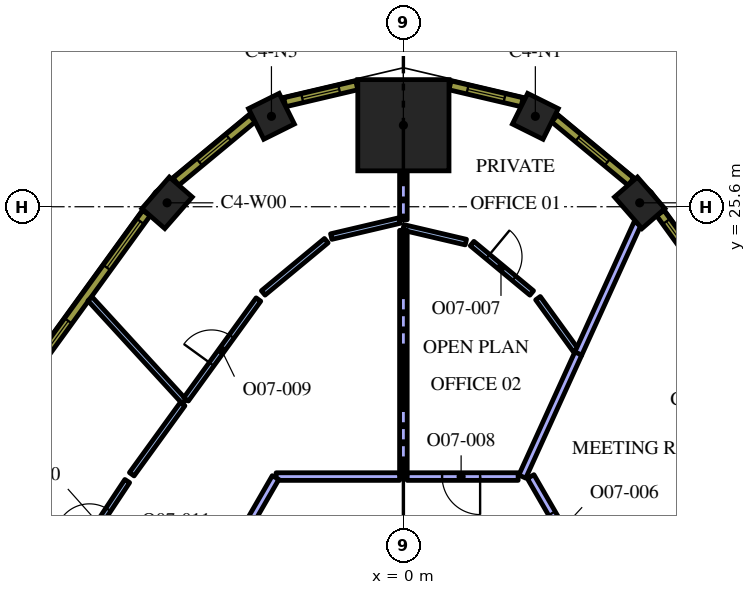
"""IFC4 building model, lengths in metres.
Left out: names, types, materials, properties, quantities, classifications, styles, units other than length and angle.
Written with IfcOpenShell. Run it as: python <this file> out.ifc"""

import sys

from ifc_helpers import new_model, si_unit, direction, frame, frame_2d, origin, origin_2d, place, context, subcontext, project, spatial, rectangle, extrude, element, fill, save


model = new_model("IFC4")
c1 = context("Model", 3, precision=1e-05, world=origin(), true_north=direction((0.0, 1.0)))
c2 = subcontext(c1, "Body", "Model", "MODEL_VIEW")
j1 = project(units=[si_unit("LENGTHUNIT", "METRE"), si_unit("PLANEANGLEUNIT", "RADIAN")], contexts=[c1])
p1 = place(None, origin())
s1 = spatial("IfcSite", under=j1, at=p1, CompositionType="ELEMENT")
p2 = place(p1, origin())
s2 = spatial("IfcBuilding", under=s1, at=p2, CompositionType="ELEMENT")
p3 = place(p2, frame((0.0, 0.0, 218.4)))
s3 = spatial("IfcBuildingStorey", under=s2, at=p3, CompositionType="ELEMENT", Elevation=218.4)
p4 = place(p3, frame((0.0, 27.744, 0.0), z_axis=(0.0, 0.0, 1.0), x_axis=(0.0, 1.0, 0.0)))
e1 = element("IfcColumn", 1, at=p4, inside=s3, PredefinedType="COLUMN", context=c2, shape_type="SweptSolid", body=[
    extrude(rectangle(XDim=2.4, YDim=2.4, at=origin_2d()), origin(), (0.0, 0.0, 1.0), 4.2),
])
p5 = place(p3, frame((6.219, 25.703, 0.0), z_axis=(0.0, 0.0, 1.0), x_axis=(-0.657250291216, 0.753672378886, 0.0)))
e2 = element("IfcColumn", 2, at=p5, inside=s3, PredefinedType="COLUMN", context=c2, shape_type="SweptSolid", body=[
    extrude(rectangle(XDim=1.1, YDim=0.8, at=origin_2d()), origin(), (0.0, 0.0, 1.0), 4.2),
])
for number, where, z_axis, x_axis in (
    (3, (3.472, 27.979, 0.0), (0.0, 0.0, 1.0), (-0.895, 0.445, 0.0)),
    (4, (-3.472, 27.979, 0.0), (0.0, 0.0, 1.0), (-0.895, -0.445, 0.0)),
):
    element("IfcColumn", number, at=place(p3, frame(where, z_axis=z_axis, x_axis=x_axis)), inside=s3, PredefinedType="COLUMN", context=c2, shape_type="SweptSolid", body=[
        extrude(rectangle(XDim=0.9, YDim=0.9, at=origin_2d()), origin(), (0.0, 0.0, 1.0), 4.2),
    ])
p6 = place(p3, frame((-6.219, 25.703, 0.0), z_axis=(0.0, 0.0, 1.0), x_axis=(-0.657250291216, -0.753672378886, 0.0)))
e5 = element("IfcColumn", 5, at=p6, inside=s3, PredefinedType="COLUMN", context=c2, shape_type="SweptSolid", body=[
    extrude(rectangle(XDim=1.1, YDim=0.8, at=origin_2d()), origin(), (0.0, 0.0, 1.0), 4.2),
])
p7 = place(p3, frame((7.011, 15.156, 0.0), z_axis=(0.0, 0.0, 1.0), x_axis=(0.866015917575, 0.500016430238, 0.0)))
e6 = element("IfcWall", 6, at=p7, inside=s3, PredefinedType="PARTITIONING", context=c2, shape_type="SweptSolid", body=[
    extrude(rectangle(XDim=5.607, YDim=0.2, at=frame_2d((2.804, 0.0))), origin(), (0.0, 0.0, 1.0), 3.45),
])
p8 = place(p3, frame((4.599, 21.729, 0.0), z_axis=(0.0, 0.0, 1.0), x_axis=(0.414300595715, 0.91014010811, 0.0)))
e7 = element("IfcWall", 7, at=p8, inside=s3, PredefinedType="PARTITIONING", context=c2, shape_type="SweptSolid", body=[
    extrude(rectangle(XDim=3.77, YDim=0.2, at=frame_2d((1.885, 0.0))), origin(), (0.0, 0.0, 1.0), 3.45),
])
p9 = place(p3, frame((3.129, 18.5, 0.0), z_axis=(0.0, 0.0, 1.0), x_axis=(0.41435618773, 0.910114800281, 0.0)))
e8 = element("IfcWall", 8, at=p9, inside=s3, PredefinedType="PARTITIONING", context=c2, shape_type="SweptSolid", body=[
    extrude(rectangle(XDim=3.557, YDim=0.2, at=frame_2d((1.779, 0.0))), origin(), (0.0, 0.0, 1.0), 3.45),
])
p10 = place(p3, frame((5.007, 15.627, 0.0), z_axis=(0.0, 0.0, 1.0), x_axis=(-0.499962429619, 0.866047093968, 0.0)))
e9 = element("IfcWall", 9, at=p10, inside=s3, PredefinedType="PARTITIONING", context=c2, shape_type="SweptSolid", body=[
    extrude(rectangle(XDim=3.317, YDim=0.2, at=frame_2d((1.659, 0.0))), origin(), (0.0, 0.0, 1.0), 3.45),
])
p11 = place(p10, frame((1.2, 0.0, 0.0)))
e10 = element("IfcOpeningElement", 10, at=p11, cuts=e9, PredefinedType="OPENING", context=c2, shape_type="SweptSolid", body=[
    extrude(rectangle(XDim=1.0, YDim=2.1, at=frame_2d((0.5, 1.05))), frame((0.0, 0.11, 0.0), z_axis=(0.0, -1.0, 0.0), x_axis=(1.0, 0.0, 0.0)), (0.0, 0.0, 1.0), 0.22),
])
p12 = place(p3, frame((4.533, 21.826, 0.0), z_axis=(0.0, 0.0, 1.0), x_axis=(-0.587019669034, 0.809572670096, 0.0)))
e11 = element("IfcWall", 11, at=p12, inside=s3, PredefinedType="PARTITIONING", context=c2, shape_type="SweptSolid", body=[
    extrude(rectangle(XDim=1.689, YDim=0.15, at=frame_2d((0.845, 0.0))), origin(), (0.0, 0.0, 1.0), 3.45),
])
p13 = place(p3, frame((1.808, 24.631, 0.0), z_axis=(0.0, 0.0, 1.0), x_axis=(0.769986239032, -0.638060492195, 0.0)))
e12 = element("IfcWall", 12, at=p13, inside=s3, PredefinedType="PARTITIONING", context=c2, shape_type="SweptSolid", body=[
    extrude(rectangle(XDim=2.038, YDim=0.15, at=frame_2d((1.019, 0.0))), origin(), (0.0, 0.0, 1.0), 3.45),
])
p14 = place(p13, frame((0.538, 0.0, 0.0)))
e13 = element("IfcOpeningElement", 13, at=p14, cuts=e12, PredefinedType="OPENING", context=c2, shape_type="SweptSolid", body=[
    extrude(rectangle(XDim=0.9, YDim=2.1, at=frame_2d((0.45, 1.05))), frame((0.0, 0.085, 0.0), z_axis=(0.0, -1.0, 0.0), x_axis=(1.0, 0.0, 0.0)), (0.0, 0.0, 1.0), 0.17),
])
p15 = place(p3, frame((1.644, 24.669, 0.0), z_axis=(0.0, 0.0, 1.0), x_axis=(-0.973521361509, 0.228596060084, 0.0)))
e14 = element("IfcWall", 14, at=p15, inside=s3, PredefinedType="PARTITIONING", context=c2, shape_type="SweptSolid", body=[
    extrude(rectangle(XDim=1.688, YDim=0.15, at=frame_2d((0.844, 0.0))), origin(), (0.0, 0.0, 1.0), 3.45),
])
p16 = place(p3, frame((0.0, 25.257, 0.0), z_axis=(0.0, 0.0, 1.0), x_axis=(0.0, 1.0, 0.0)))
e15 = element("IfcWall", 15, at=p16, inside=s3, PredefinedType="PARTITIONING", context=c2, shape_type="SweptSolid", body=[
    extrude(rectangle(XDim=1.288, YDim=0.2, at=frame_2d((0.644, 0.0))), origin(), (0.0, 0.0, 1.0), 3.45),
])
p17 = place(p3, frame((0.0, 18.5, 0.0), z_axis=(0.0, 0.0, 1.0), x_axis=(0.0, 1.0, 0.0)))
e16 = element("IfcWall", 16, at=p17, inside=s3, PredefinedType="PARTITIONING", context=c2, shape_type="SweptSolid", body=[
    extrude(rectangle(XDim=6.479, YDim=0.2, at=frame_2d((3.239, 0.0))), origin(), (0.0, 0.0, 1.0), 3.45),
])
p18 = place(p3, frame((3.019, 18.5, 0.0), z_axis=(0.0, 0.0, 1.0), x_axis=(-1.0, 0.0, 0.0)))
e17 = element("IfcWall", 17, at=p18, inside=s3, PredefinedType="PARTITIONING", context=c2, shape_type="SweptSolid", body=[
    extrude(rectangle(XDim=2.919, YDim=0.2, at=frame_2d((1.459, 0.0))), origin(), (0.0, 0.0, 1.0), 3.45),
])
p19 = place(p18, frame((1.0, 0.0, 0.0)))
e18 = element("IfcOpeningElement", 18, at=p19, cuts=e17, PredefinedType="OPENING", context=c2, shape_type="SweptSolid", body=[
    extrude(rectangle(XDim=1.0, YDim=2.1, at=frame_2d((0.5, 1.05))), frame((0.0, 0.11, 0.0), z_axis=(0.0, -1.0, 0.0), x_axis=(1.0, 0.0, 0.0)), (0.0, 0.0, 1.0), 0.22),
])
p20 = place(p3, frame((-5.764, 20.469, 0.0), z_axis=(0.0, 0.0, 1.0), x_axis=(-0.675673477211, 0.737201025632, 0.0)))
e19 = element("IfcWall", 19, at=p20, inside=s3, PredefinedType="PARTITIONING", context=c2, shape_type="SweptSolid", body=[
    extrude(rectangle(XDim=3.674, YDim=0.15, at=frame_2d((1.837, 0.0))), origin(), (0.0, 0.0, 1.0), 3.45),
])
p21 = place(p3, frame((-0.1, 25.237, 0.0), z_axis=(0.0, 0.0, 1.0), x_axis=(-0.973501996937, -0.22867851224, 0.0)))
e20 = element("IfcWall", 20, at=p21, inside=s3, PredefinedType="PARTITIONING", context=c2, shape_type="SweptSolid", body=[
    extrude(rectangle(XDim=1.848, YDim=0.15, at=frame_2d((0.924, 0.0))), origin(), (0.0, 0.0, 1.0), 3.45),
])
p22 = place(p3, frame((-2.029, 24.707, 0.0), z_axis=(0.0, 0.0, 1.0), x_axis=(-0.769991356208, -0.63805431694, 0.0)))
e21 = element("IfcWall", 21, at=p22, inside=s3, PredefinedType="PARTITIONING", context=c2, shape_type="SweptSolid", body=[
    extrude(rectangle(XDim=2.156, YDim=0.15, at=frame_2d((1.078, 0.0))), origin(), (0.0, 0.0, 1.0), 3.45),
])
p23 = place(p3, frame((-5.719, 20.531, 0.0), z_axis=(0.0, 0.0, 1.0), x_axis=(0.586981132734, 0.809600611298, 0.0)))
e22 = element("IfcWall", 22, at=p23, inside=s3, PredefinedType="PARTITIONING", context=c2, shape_type="SweptSolid", body=[
    extrude(rectangle(XDim=3.245, YDim=0.15, at=frame_2d((1.623, 0.0))), origin(), (0.0, 0.0, 1.0), 3.45),
])
p24 = place(p23, frame((1.145, 0.0, 0.0)))
e23 = element("IfcOpeningElement", 23, at=p24, cuts=e22, PredefinedType="OPENING", context=c2, shape_type="SweptSolid", body=[
    extrude(rectangle(XDim=0.9, YDim=2.1, at=frame_2d((0.45, 1.05))), frame((0.0, 0.085, 0.0), z_axis=(0.0, -1.0, 0.0), x_axis=(1.0, 0.0, 0.0)), (0.0, 0.0, 1.0), 0.17),
])
p25 = place(p3, frame((-5.809, 20.407, 0.0), z_axis=(0.0, 0.0, 1.0), x_axis=(-0.587095604593, -0.809517603927, 0.0)))
e24 = element("IfcWall", 24, at=p25, inside=s3, PredefinedType="PARTITIONING", context=c2, shape_type="SweptSolid", body=[
    extrude(rectangle(XDim=2.281, YDim=0.15, at=frame_2d((1.141, 0.0))), origin(), (0.0, 0.0, 1.0), 3.45),
])
p26 = place(p3, frame((-8.744, 16.156, 0.0), z_axis=(0.0, 0.0, 1.0), x_axis=(0.552885218102, 0.833257424572, 0.0)))
e25 = element("IfcWall", 25, at=p26, inside=s3, PredefinedType="PARTITIONING", context=c2, shape_type="SweptSolid", body=[
    extrude(rectangle(XDim=2.672, YDim=0.15, at=frame_2d((1.336, 0.0))), origin(), (0.0, 0.0, 1.0), 3.45),
])
p27 = place(p26, frame((0.872, 0.0, 0.0)))
e26 = element("IfcOpeningElement", 26, at=p27, cuts=e25, PredefinedType="OPENING", context=c2, shape_type="SweptSolid", body=[
    extrude(rectangle(XDim=0.9, YDim=2.1, at=frame_2d((0.45, 1.05))), frame((0.0, 0.085, 0.0), z_axis=(0.0, -1.0, 0.0), x_axis=(1.0, 0.0, 0.0)), (0.0, 0.0, 1.0), 0.17),
])
p28 = place(p3, frame((-8.809, 16.194, 0.0), z_axis=(0.0, 0.0, 1.0), x_axis=(-0.865996792572, 0.500049552799, 0.0)))
e27 = element("IfcWall", 27, at=p28, inside=s3, PredefinedType="PARTITIONING", context=c2, shape_type="SweptSolid", body=[
    extrude(rectangle(XDim=3.532, YDim=0.15, at=frame_2d((1.766, 0.0))), origin(), (0.0, 0.0, 1.0), 3.45),
])
p29 = place(p3, frame((-0.1, 18.5, 0.0), z_axis=(0.0, 0.0, 1.0), x_axis=(-1.0, 0.0, 0.0)))
e28 = element("IfcWall", 28, at=p29, inside=s3, PredefinedType="PARTITIONING", context=c2, shape_type="SweptSolid", body=[
    extrude(rectangle(XDim=3.249, YDim=0.2, at=frame_2d((1.624, 0.0))), origin(), (0.0, 0.0, 1.0), 3.45),
])
p30 = place(p3, frame((-3.364, 18.474, 0.0), z_axis=(0.0, 0.0, 1.0), x_axis=(-0.500007432598, -0.866021112529, 0.0)))
e29 = element("IfcWall", 29, at=p30, inside=s3, PredefinedType="PARTITIONING", context=c2, shape_type="SweptSolid", body=[
    extrude(rectangle(XDim=4.623, YDim=0.2, at=frame_2d((2.311, 0.0))), origin(), (0.0, 0.0, 1.0), 3.45),
])
p31 = place(p30, frame((1.8, 0.0, 0.0)))
e30 = element("IfcOpeningElement", 30, at=p31, cuts=e29, PredefinedType="OPENING", context=c2, shape_type="SweptSolid", body=[
    extrude(rectangle(XDim=1.0, YDim=2.1, at=frame_2d((0.5, 1.05))), frame((0.0, 0.11, 0.0), z_axis=(0.0, -1.0, 0.0), x_axis=(1.0, 0.0, 0.0)), (0.0, 0.0, 1.0), 0.22),
])
p32 = place(p3, frame((9.878, 21.132, 0.0), z_axis=(0.0, 0.0, 1.0), x_axis=(-0.586998456641, 0.80958805074, 0.0)))
e31 = element("IfcWall", 31, at=p32, inside=s3, PredefinedType="SOLIDWALL", context=c2, shape_type="SweptSolid", body=[
    extrude(rectangle(XDim=5.311, YDim=0.24, at=frame_2d((2.655, 0.0))), origin(), (0.0, 0.0, 1.0), 3.95),
])
p33 = place(p32, frame((0.306, 0.0, 0.9)))
e32 = element("IfcOpeningElement", 32, at=p33, cuts=e31, PredefinedType="OPENING", context=c2, shape_type="SweptSolid", body=[
    extrude(rectangle(XDim=1.5, YDim=2.55, at=frame_2d((0.75, 1.275))), frame((0.0, 0.13, 0.0), z_axis=(0.0, -1.0, 0.0), x_axis=(1.0, 0.0, 0.0)), (0.0, 0.0, 1.0), 0.26),
])
p34 = place(p32, frame((3.539, 0.0, 0.9)))
e33 = element("IfcOpeningElement", 33, at=p34, cuts=e31, PredefinedType="OPENING", context=c2, shape_type="SweptSolid", body=[
    extrude(rectangle(XDim=1.5, YDim=2.55, at=frame_2d((0.75, 1.275))), frame((0.0, 0.13, 0.0), z_axis=(0.0, -1.0, 0.0), x_axis=(1.0, 0.0, 0.0)), (0.0, 0.0, 1.0), 0.26),
])
p35 = place(p3, frame((5.987, 26.259, 0.0), z_axis=(0.0, 0.0, 1.0), x_axis=(-0.769990037733, 0.638055908045, 0.0)))
e34 = element("IfcWall", 34, at=p35, inside=s3, PredefinedType="SOLIDWALL", context=c2, shape_type="SweptSolid", body=[
    extrude(rectangle(XDim=2.609, YDim=0.24, at=frame_2d((1.305, 0.0))), origin(), (0.0, 0.0, 1.0), 3.95),
])
p36 = place(p35, frame((0.805, 0.0, 0.9)))
e35 = element("IfcOpeningElement", 35, at=p36, cuts=e34, PredefinedType="OPENING", context=c2, shape_type="SweptSolid", body=[
    extrude(rectangle(XDim=1.0, YDim=2.55, at=frame_2d((0.5, 1.275))), frame((0.0, 0.13, 0.0), z_axis=(0.0, -1.0, 0.0), x_axis=(1.0, 0.0, 0.0)), (0.0, 0.0, 1.0), 0.26),
])
p37 = place(p3, frame((3.123, 28.349, 0.0), z_axis=(0.0, 0.0, 1.0), x_axis=(-0.973515706272, 0.228620142686, 0.0)))
e36 = element("IfcWall", 36, at=p37, inside=s3, PredefinedType="SOLIDWALL", context=c2, shape_type="SweptSolid", body=[
    extrude(rectangle(XDim=1.948, YDim=0.24, at=frame_2d((0.974, 0.0))), origin(), (0.0, 0.0, 1.0), 3.95),
])
p38 = place(p37, frame((0.474, 0.0, 0.9)))
e37 = element("IfcOpeningElement", 37, at=p38, cuts=e36, PredefinedType="OPENING", context=c2, shape_type="SweptSolid", body=[
    extrude(rectangle(XDim=1.0, YDim=2.55, at=frame_2d((0.5, 1.275))), frame((0.0, 0.13, 0.0), z_axis=(0.0, -1.0, 0.0), x_axis=(1.0, 0.0, 0.0)), (0.0, 0.0, 1.0), 0.26),
])
p39 = place(p3, frame((-1.227, 28.794, 0.0), z_axis=(0.0, 0.0, 1.0), x_axis=(-0.973515706272, -0.228620142686, 0.0)))
e38 = element("IfcWall", 38, at=p39, inside=s3, PredefinedType="SOLIDWALL", context=c2, shape_type="SweptSolid", body=[
    extrude(rectangle(XDim=1.948, YDim=0.24, at=frame_2d((0.974, 0.0))), origin(), (0.0, 0.0, 1.0), 3.95),
])
p40 = place(p39, frame((0.474, 0.0, 0.9)))
e39 = element("IfcOpeningElement", 39, at=p40, cuts=e38, PredefinedType="OPENING", context=c2, shape_type="SweptSolid", body=[
    extrude(rectangle(XDim=1.0, YDim=2.55, at=frame_2d((0.5, 1.275))), frame((0.0, 0.13, 0.0), z_axis=(0.0, -1.0, 0.0), x_axis=(1.0, 0.0, 0.0)), (0.0, 0.0, 1.0), 0.26),
])
p41 = place(p3, frame((-3.978, 27.924, 0.0), z_axis=(0.0, 0.0, 1.0), x_axis=(-0.769990037733, -0.638055908045, 0.0)))
e40 = element("IfcWall", 40, at=p41, inside=s3, PredefinedType="SOLIDWALL", context=c2, shape_type="SweptSolid", body=[
    extrude(rectangle(XDim=2.609, YDim=0.24, at=frame_2d((1.305, 0.0))), origin(), (0.0, 0.0, 1.0), 3.95),
])
p42 = place(p41, frame((0.805, 0.0, 0.9)))
e41 = element("IfcOpeningElement", 41, at=p42, cuts=e40, PredefinedType="OPENING", context=c2, shape_type="SweptSolid", body=[
    extrude(rectangle(XDim=1.0, YDim=2.55, at=frame_2d((0.5, 1.275))), frame((0.0, 0.13, 0.0), z_axis=(0.0, -1.0, 0.0), x_axis=(1.0, 0.0, 0.0)), (0.0, 0.0, 1.0), 0.26),
])
p43 = place(p3, frame((-6.761, 25.432, 0.0), z_axis=(0.0, 0.0, 1.0), x_axis=(-0.586998456641, -0.80958805074, 0.0)))
e42 = element("IfcWall", 42, at=p43, inside=s3, PredefinedType="SOLIDWALL", context=c2, shape_type="SweptSolid", body=[
    extrude(rectangle(XDim=5.311, YDim=0.24, at=frame_2d((2.655, 0.0))), origin(), (0.0, 0.0, 1.0), 3.95),
])
p44 = place(p43, frame((0.271, 0.0, 0.9)))
e43 = element("IfcOpeningElement", 43, at=p44, cuts=e42, PredefinedType="OPENING", context=c2, shape_type="SweptSolid", body=[
    extrude(rectangle(XDim=1.5, YDim=2.55, at=frame_2d((0.75, 1.275))), frame((0.0, 0.13, 0.0), z_axis=(0.0, -1.0, 0.0), x_axis=(1.0, 0.0, 0.0)), (0.0, 0.0, 1.0), 0.26),
])
p45 = place(p43, frame((3.504, 0.0, 0.9)))
e44 = element("IfcOpeningElement", 44, at=p45, cuts=e42, PredefinedType="OPENING", context=c2, shape_type="SweptSolid", body=[
    extrude(rectangle(XDim=1.5, YDim=2.55, at=frame_2d((0.75, 1.275))), frame((0.0, 0.13, 0.0), z_axis=(0.0, -1.0, 0.0), x_axis=(1.0, 0.0, 0.0)), (0.0, 0.0, 1.0), 0.26),
])
p46 = place(p11, origin())
e45 = element("IfcDoor", 45, at=p46, inside=s3, OperationType="SINGLE_SWING_RIGHT", PredefinedType="DOOR", context=c2, shape_type="SweptSolid", body=[
    extrude(rectangle(XDim=1.0, YDim=2.1, at=frame_2d((0.5, 1.05))), frame((0.0, 0.025, 0.0), z_axis=(0.0, -1.0, 0.0), x_axis=(1.0, 0.0, 0.0)), (0.0, 0.0, 1.0), 0.05),
])
fill(e10, e45)
p47 = place(p14, origin())
e46 = element("IfcDoor", 46, at=p47, inside=s3, OperationType="SINGLE_SWING_LEFT", PredefinedType="DOOR", context=c2, shape_type="SweptSolid", body=[
    extrude(rectangle(XDim=0.9, YDim=2.1, at=frame_2d((0.45, 1.05))), frame((0.0, 0.025, 0.0), z_axis=(0.0, -1.0, 0.0), x_axis=(1.0, 0.0, 0.0)), (0.0, 0.0, 1.0), 0.05),
])
fill(e13, e46)
p48 = place(p19, origin())
e47 = element("IfcDoor", 47, at=p48, inside=s3, OperationType="SINGLE_SWING_RIGHT", PredefinedType="DOOR", context=c2, shape_type="SweptSolid", body=[
    extrude(rectangle(XDim=1.0, YDim=2.1, at=frame_2d((0.5, 1.05))), frame((0.0, 0.025, 0.0), z_axis=(0.0, -1.0, 0.0), x_axis=(1.0, 0.0, 0.0)), (0.0, 0.0, 1.0), 0.05),
])
fill(e18, e47)
p49 = place(p24, origin())
e48 = element("IfcDoor", 48, at=p49, inside=s3, OperationType="SINGLE_SWING_LEFT", PredefinedType="DOOR", context=c2, shape_type="SweptSolid", body=[
    extrude(rectangle(XDim=0.9, YDim=2.1, at=frame_2d((0.45, 1.05))), frame((0.0, 0.025, 0.0), z_axis=(0.0, -1.0, 0.0), x_axis=(1.0, 0.0, 0.0)), (0.0, 0.0, 1.0), 0.05),
])
fill(e23, e48)
p50 = place(p27, origin())
e49 = element("IfcDoor", 49, at=p50, inside=s3, OperationType="SINGLE_SWING_LEFT", PredefinedType="DOOR", context=c2, shape_type="SweptSolid", body=[
    extrude(rectangle(XDim=0.9, YDim=2.1, at=frame_2d((0.45, 1.05))), frame((0.0, 0.025, 0.0), z_axis=(0.0, -1.0, 0.0), x_axis=(1.0, 0.0, 0.0)), (0.0, 0.0, 1.0), 0.05),
])
fill(e26, e49)
p51 = place(p34, origin())
e50 = element("IfcWindow", 50, at=p51, inside=s3, PartitioningType="SINGLE_PANEL", PredefinedType="WINDOW", context=c2, shape_type="SweptSolid", body=[
    extrude(rectangle(XDim=1.5, YDim=2.55, at=frame_2d((0.75, 1.275))), frame((0.0, 0.04, 0.0), z_axis=(0.0, -1.0, 0.0), x_axis=(1.0, 0.0, 0.0)), (0.0, 0.0, 1.0), 0.06),
])
fill(e33, e50)
p52 = place(p36, origin())
e51 = element("IfcWindow", 51, at=p52, inside=s3, PartitioningType="SINGLE_PANEL", PredefinedType="WINDOW", context=c2, shape_type="SweptSolid", body=[
    extrude(rectangle(XDim=1.0, YDim=2.55, at=frame_2d((0.5, 1.275))), frame((0.0, 0.04, 0.0), z_axis=(0.0, -1.0, 0.0), x_axis=(1.0, 0.0, 0.0)), (0.0, 0.0, 1.0), 0.06),
])
fill(e35, e51)
p53 = place(p38, origin())
e52 = element("IfcWindow", 52, at=p53, inside=s3, PartitioningType="SINGLE_PANEL", PredefinedType="WINDOW", context=c2, shape_type="SweptSolid", body=[
    extrude(rectangle(XDim=1.0, YDim=2.55, at=frame_2d((0.5, 1.275))), frame((0.0, 0.04, 0.0), z_axis=(0.0, -1.0, 0.0), x_axis=(1.0, 0.0, 0.0)), (0.0, 0.0, 1.0), 0.06),
])
fill(e37, e52)
p54 = place(p40, origin())
e53 = element("IfcWindow", 53, at=p54, inside=s3, PartitioningType="SINGLE_PANEL", PredefinedType="WINDOW", context=c2, shape_type="SweptSolid", body=[
    extrude(rectangle(XDim=1.0, YDim=2.55, at=frame_2d((0.5, 1.275))), frame((0.0, 0.04, 0.0), z_axis=(0.0, -1.0, 0.0), x_axis=(1.0, 0.0, 0.0)), (0.0, 0.0, 1.0), 0.06),
])
fill(e39, e53)
p55 = place(p42, origin())
e54 = element("IfcWindow", 54, at=p55, inside=s3, PartitioningType="SINGLE_PANEL", PredefinedType="WINDOW", context=c2, shape_type="SweptSolid", body=[
    extrude(rectangle(XDim=1.0, YDim=2.55, at=frame_2d((0.5, 1.275))), frame((0.0, 0.04, 0.0), z_axis=(0.0, -1.0, 0.0), x_axis=(1.0, 0.0, 0.0)), (0.0, 0.0, 1.0), 0.06),
])
fill(e41, e54)
p56 = place(p44, origin())
e55 = element("IfcWindow", 55, at=p56, inside=s3, PartitioningType="SINGLE_PANEL", PredefinedType="WINDOW", context=c2, shape_type="SweptSolid", body=[
    extrude(rectangle(XDim=1.5, YDim=2.55, at=frame_2d((0.75, 1.275))), frame((0.0, 0.04, 0.0), z_axis=(0.0, -1.0, 0.0), x_axis=(1.0, 0.0, 0.0)), (0.0, 0.0, 1.0), 0.06),
])
fill(e43, e55)
p57 = place(p45, origin())
e56 = element("IfcWindow", 56, at=p57, inside=s3, PartitioningType="SINGLE_PANEL", PredefinedType="WINDOW", context=c2, shape_type="SweptSolid", body=[
    extrude(rectangle(XDim=1.5, YDim=2.55, at=frame_2d((0.75, 1.275))), frame((0.0, 0.04, 0.0), z_axis=(0.0, -1.0, 0.0), x_axis=(1.0, 0.0, 0.0)), (0.0, 0.0, 1.0), 0.06),
])
fill(e44, e56)
save(model, sys.argv[1])
